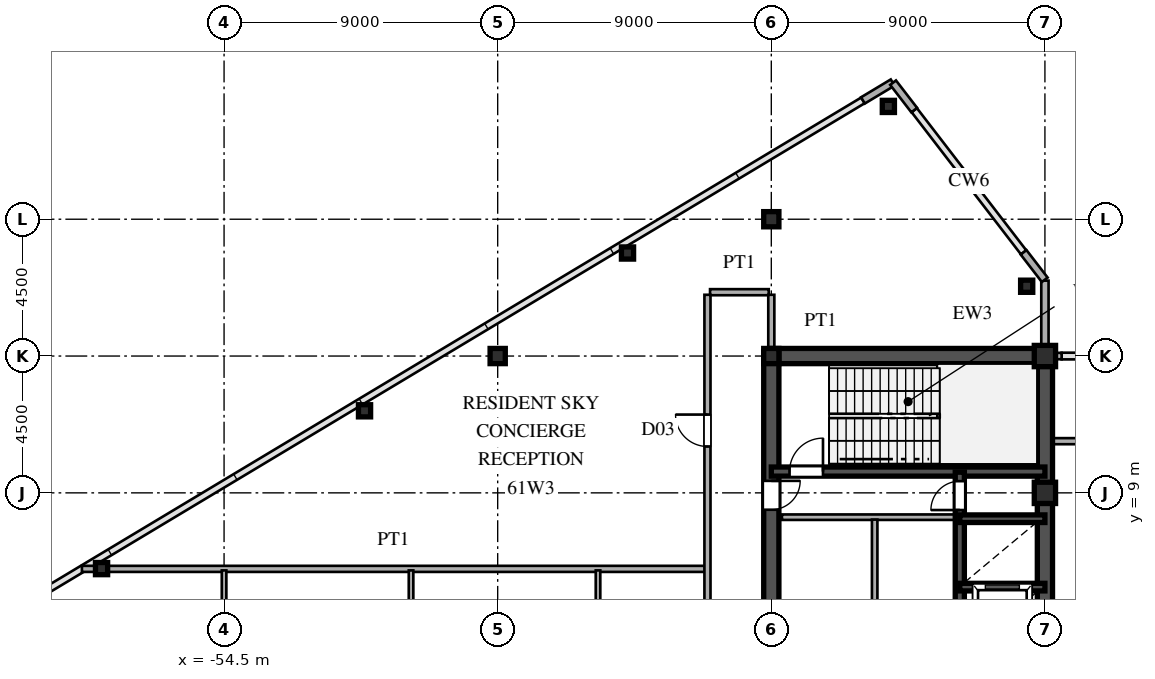
"""IFC4 building model, lengths in metres.
Left out: names, types, materials, properties, quantities, classifications, styles, units other than length and angle.
Written with IfcOpenShell. Run it as: python <this file> out.ifc"""

import sys

from ifc_helpers import new_model, si_unit, direction, frame, frame_2d, origin, origin_2d, place, context, subcontext, project, spatial, rectangle, hollow_rectangle, i_section, extrude, source, transform, mapped, element, fill, save


model = new_model("IFC4")
c1 = context("Model", 3, precision=1e-05, world=origin(), true_north=direction((0.0, 1.0)))
c2 = subcontext(c1, "Body", "Model", "MODEL_VIEW")
j1 = project(units=[si_unit("LENGTHUNIT", "METRE"), si_unit("PLANEANGLEUNIT", "RADIAN")], contexts=[c1])
p1 = place(None, origin())
s1 = spatial("IfcSite", under=j1, at=p1, CompositionType="ELEMENT")
p2 = place(p1, origin())
s2 = spatial("IfcBuilding", under=s1, at=p2, CompositionType="ELEMENT")
p3 = place(p2, frame((0.0, 0.0, 229.8)))
s3 = spatial("IfcBuildingStorey", under=s2, at=p3, CompositionType="ELEMENT", Elevation=229.8)
m1 = source(origin(), c2, "Body", "SweptSolid", [
    extrude(hollow_rectangle(XDim=0.7, YDim=0.7, WallThickness=0.03, at=origin_2d()), origin(), (0.0, 0.0, 1.0), 4.8),
])
for number, where, z_axis, x_axis in (
    (1, (-27.5, 9.0, 0.0), (0.0, 0.0, 1.0), (1.0, 0.0, 0.0)),
    (2, (-27.5, 13.5, 0.0), (0.0, 0.0, 1.0), (1.0, 0.0, 0.0)),
):
    element("IfcColumn", number, at=place(p3, frame(where, z_axis=z_axis, x_axis=x_axis)), inside=s3, PredefinedType="COLUMN", context=c2, shape_type="MappedRepresentation", body=[
        mapped(m1, transform((0.0, 0.0, 0.0), scale=1.0)),
    ])
m2 = source(origin(), c2, "Body", "SweptSolid", [
    extrude(i_section(OverallWidth=0.5, OverallDepth=0.5, WebThickness=0.02, FlangeThickness=0.032, at=origin_2d()), origin(), (0.0, 0.0, 1.0), 4.8),
])
for number, where, z_axis, x_axis in (
    (3, (-36.5, 13.5, 0.0), (0.0, 0.0, 1.0), (1.0, 0.0, 0.0)),
    (4, (-36.5, 18.0, 0.0), (0.0, 0.0, 1.0), (1.0, 0.0, 0.0)),
    (5, (-45.5, 13.5, 0.0), (0.0, 0.0, 1.0), (1.0, 0.0, 0.0)),
):
    element("IfcColumn", number, at=place(p3, frame(where, z_axis=z_axis, x_axis=x_axis)), inside=s3, PredefinedType="COLUMN", context=c2, shape_type="MappedRepresentation", body=[
        mapped(m2, transform((0.0, 0.0, 0.0), scale=1.0)),
    ])
m3 = source(origin(), c2, "Body", "SweptSolid", [
    extrude(hollow_rectangle(XDim=0.4, YDim=0.4, WallThickness=0.016, at=origin_2d()), origin(), (0.0, 0.0, 1.0), 4.8),
])
for number, where, z_axis, x_axis in (
    (6, (-28.1, 15.796, 0.0), (0.0, 0.0, 1.0), (1.0, 0.0, 0.0)),
    (7, (-32.65, 21.71, 0.0), (0.0, 0.0, 1.0), (1.0, 0.0, 0.0)),
    (8, (-41.23, 16.889, 0.0), (0.0, 0.0, 1.0), (1.0, 0.0, 0.0)),
    (9, (-49.88, 11.699, 0.0), (0.0, 0.0, 1.0), (1.0, 0.0, 0.0)),
    (10, (-58.53, 6.509, 0.0), (0.0, 0.0, 1.0), (1.0, 0.0, 0.0)),
):
    element("IfcColumn", number, at=place(p3, frame(where, z_axis=z_axis, x_axis=x_axis)), inside=s3, PredefinedType="COLUMN", context=c2, shape_type="MappedRepresentation", body=[
        mapped(m3, transform((0.0, 0.0, 0.0), scale=1.0)),
    ])
p4 = place(p3, frame((-27.5, 13.755, 0.0), z_axis=(0.0, 0.0, 1.0), x_axis=(0.0, 1.0, 0.0)))
e11 = element("IfcWall", 11, at=p4, inside=s3, PredefinedType="SOLIDWALL", context=c2, shape_type="SweptSolid", body=[
    extrude(rectangle(XDim=0.62, YDim=0.24, at=frame_2d((0.31, 0.0))), origin(), (0.0, 0.0, 1.0), 4.04),
])
p5 = place(p3, frame((-27.5, 14.375, 0.0), z_axis=(0.0, 0.0, 1.0), x_axis=(0.0, 1.0, 0.0)))
e12 = element("IfcWall", 12, at=p5, inside=s3, PredefinedType="SOLIDWALL", context=c2, shape_type="SweptSolid", body=[
    extrude(rectangle(XDim=1.605, YDim=0.24, at=frame_2d((0.803, 0.0))), origin(), (0.0, 0.0, 1.0), 4.54),
])
for number, where, z_axis, x_axis in (
    (13, (-27.506, 16.008, 0.0), (0.0, 0.0, 1.0), (-0.61, 0.793, 0.0)),
    (14, (-31.799, 21.588, 0.0), (0.0, 0.0, 1.0), (-0.61, 0.793, 0.0)),
    (15, (-32.509, 22.495, 0.0), (0.0, 0.0, 1.0), (-0.857, -0.515, 0.0)),
):
    element("IfcWall", number, at=place(p3, frame(where, z_axis=z_axis, x_axis=x_axis)), inside=s3, PredefinedType="SOLIDWALL", context=c2, shape_type="SweptSolid", body=[
        extrude(rectangle(XDim=1.14, YDim=0.24, at=frame_2d((0.57, 0.0))), origin(), (0.0, 0.0, 1.0), 4.54),
    ])
p6 = place(p3, frame((-27.49, 13.5, 0.0), z_axis=(0.0, 0.0, 1.0), x_axis=(1.0, 0.0, 0.0)))
e16 = element("IfcWall", 16, at=p6, inside=s3, PredefinedType="SOLIDWALL", context=c2, shape_type="SweptSolid", body=[
    extrude(rectangle(XDim=0.54, YDim=0.21, at=frame_2d((0.27, 0.0))), origin(), (0.0, 0.0, 1.0), 2.54),
])
p7 = place(p3, frame((-27.5, 1.3, 0.0), z_axis=(0.0, 0.0, 1.0), x_axis=(0.0, 1.0, 0.0)))
e17 = element("IfcWall", 17, at=p7, inside=s3, PredefinedType="SHEAR", context=c2, shape_type="SweptSolid", body=[
    extrude(rectangle(XDim=12.2, YDim=0.5, at=frame_2d((6.1, 0.0))), origin(), (0.0, 0.0, 1.0), 4.54),
])
p8 = place(p3, frame((-36.5, 13.5, 0.0), z_axis=(0.0, 0.0, 1.0), x_axis=(1.0, 0.0, 0.0)))
e18 = element("IfcWall", 18, at=p8, inside=s3, PredefinedType="SHEAR", context=c2, shape_type="SweptSolid", body=[
    extrude(rectangle(XDim=9.0, YDim=0.5, at=frame_2d((4.5, 0.0))), origin(), (0.0, 0.0, 1.0), 4.54),
])
p9 = place(p3, frame((-36.5, 8.2, 0.0), z_axis=(0.0, 0.0, 1.0), x_axis=(0.0, 1.0, 0.0)))
e19 = element("IfcWall", 19, at=p9, inside=s3, PredefinedType="SHEAR", context=c2, shape_type="SweptSolid", body=[
    extrude(rectangle(XDim=5.45, YDim=0.5, at=frame_2d((2.725, 0.0))), origin(), (0.0, 0.0, 1.0), 4.54),
])
p10 = place(p9, frame((0.245, 0.0, 0.0)))
e20 = element("IfcOpeningElement", 20, at=p10, cuts=e19, PredefinedType="OPENING", context=c2, shape_type="SweptSolid", body=[
    extrude(rectangle(XDim=0.95, YDim=2.15, at=frame_2d((0.475, 1.075))), frame((0.0, 0.26, 0.0), z_axis=(0.0, -1.0, 0.0), x_axis=(1.0, 0.0, 0.0)), (0.0, 0.0, 1.0), 0.52),
])
p11 = place(p3, frame((-36.5, 1.3, 0.0), z_axis=(0.0, 0.0, 1.0), x_axis=(0.0, 1.0, 0.0)))
e21 = element("IfcWall", 21, at=p11, inside=s3, PredefinedType="SHEAR", context=c2, shape_type="SweptSolid", body=[
    extrude(rectangle(XDim=6.9, YDim=0.5, at=frame_2d((3.45, 0.0))), origin(), (0.0, 0.0, 1.0), 4.54),
])
p12 = place(p11, frame((2.975, 0.0, 0.0)))
e22 = element("IfcOpeningElement", 22, at=p12, cuts=e21, PredefinedType="OPENING", context=c2, shape_type="SweptSolid", body=[
    extrude(rectangle(XDim=0.95, YDim=2.15, at=frame_2d((0.475, 1.075))), frame((0.0, 0.26, 0.0), z_axis=(0.0, -1.0, 0.0), x_axis=(1.0, 0.0, 0.0)), (0.0, 0.0, 1.0), 0.52),
])
p13 = place(p3, frame((-36.5, 9.7, 0.0), z_axis=(0.0, 0.0, 1.0), x_axis=(1.0, 0.0, 0.0)))
e23 = element("IfcWall", 23, at=p13, inside=s3, PredefinedType="SHEAR", context=c2, shape_type="SweptSolid", body=[
    extrude(rectangle(XDim=9.0, YDim=0.3, at=frame_2d((4.5, 0.0))), origin(), (0.0, 0.0, 1.0), 4.54),
])
p14 = place(p13, frame((0.6, 0.0, 0.0)))
e24 = element("IfcOpeningElement", 24, at=p14, cuts=e23, PredefinedType="OPENING", context=c2, shape_type="SweptSolid", body=[
    extrude(rectangle(XDim=1.1, YDim=2.2, at=frame_2d((0.55, 1.1))), frame((0.0, 0.16, 0.0), z_axis=(0.0, -1.0, 0.0), x_axis=(1.0, 0.0, 0.0)), (0.0, 0.0, 1.0), 0.32),
])
for number, where, z_axis, x_axis in (
    (25, (-30.3, 5.9, 0.0), (0.0, 0.0, 1.0), (1.0, 0.0, 0.0)),
    (26, (-30.3, 8.15, 0.0), (0.0, 0.0, 1.0), (1.0, 0.0, 0.0)),
):
    element("IfcWall", number, at=place(p3, frame(where, z_axis=z_axis, x_axis=x_axis)), inside=s3, PredefinedType="SHEAR", context=c2, shape_type="SweptSolid", body=[
        extrude(rectangle(XDim=2.8, YDim=0.25, at=frame_2d((1.4, 0.0))), origin(), (0.0, 0.0, 1.0), 4.54),
    ])
p15 = place(p3, frame((-30.3, 3.6, 0.0), z_axis=(0.0, 0.0, 1.0), x_axis=(0.0, 1.0, 0.0)))
e27 = element("IfcWall", 27, at=p15, inside=s3, PredefinedType="SHEAR", context=c2, shape_type="SweptSolid", body=[
    extrude(rectangle(XDim=2.3, YDim=0.3, at=frame_2d((1.15, 0.0))), origin(), (0.0, 0.0, 1.0), 4.54),
])
p16 = place(p15, frame((0.6, 0.0, 0.0)))
e28 = element("IfcOpeningElement", 28, at=p16, cuts=e27, PredefinedType="OPENING", context=c2, shape_type="SweptSolid", body=[
    extrude(rectangle(XDim=1.1, YDim=2.2, at=frame_2d((0.55, 1.1))), frame((0.0, 0.16, 0.0), z_axis=(0.0, -1.0, 0.0), x_axis=(1.0, 0.0, 0.0)), (0.0, 0.0, 1.0), 0.32),
])
p17 = place(p3, frame((-30.3, 5.9, 0.0), z_axis=(0.0, 0.0, 1.0), x_axis=(0.0, 1.0, 0.0)))
e29 = element("IfcWall", 29, at=p17, inside=s3, PredefinedType="SHEAR", context=c2, shape_type="SweptSolid", body=[
    extrude(rectangle(XDim=2.25, YDim=0.3, at=frame_2d((1.125, 0.0))), origin(), (0.0, 0.0, 1.0), 4.54),
])
p18 = place(p3, frame((-30.3, 8.15, 0.0), z_axis=(0.0, 0.0, 1.0), x_axis=(0.0, 1.0, 0.0)))
e30 = element("IfcWall", 30, at=p18, inside=s3, PredefinedType="SHEAR", context=c2, shape_type="SweptSolid", body=[
    extrude(rectangle(XDim=1.53, YDim=0.3, at=frame_2d((0.765, 0.0))), origin(), (0.0, 0.0, 1.0), 4.54),
])
p19 = place(p18, frame((0.285, 0.0, 0.0)))
e31 = element("IfcOpeningElement", 31, at=p19, cuts=e30, PredefinedType="OPENING", context=c2, shape_type="SweptSolid", body=[
    extrude(rectangle(XDim=0.95, YDim=2.15, at=frame_2d((0.475, 1.075))), frame((0.0, 0.16, 0.0), z_axis=(0.0, -1.0, 0.0), x_axis=(1.0, 0.0, 0.0)), (0.0, 0.0, 1.0), 0.32),
])
p20 = place(p3, frame((-36.15, 8.2, 0.0), z_axis=(0.0, 0.0, 1.0), x_axis=(1.0, 0.0, 0.0)))
e32 = element("IfcWall", 32, at=p20, inside=s3, PredefinedType="PARTITIONING", context=c2, shape_type="SweptSolid", body=[
    extrude(rectangle(XDim=5.7, YDim=0.18, at=frame_2d((2.85, 0.0))), origin(), (0.0, 0.0, 1.0), 4.54),
])
p21 = place(p3, frame((-33.1, 1.38, 0.0), z_axis=(0.0, 0.0, 1.0), x_axis=(0.0, 1.0, 0.0)))
e33 = element("IfcWall", 33, at=p21, inside=s3, PredefinedType="PARTITIONING", context=c2, shape_type="SweptSolid", body=[
    extrude(rectangle(XDim=6.74, YDim=0.18, at=frame_2d((3.37, 0.0))), origin(), (0.0, 0.0, 1.0), 4.54),
])
p22 = place(p3, frame((-59.176, 6.5, 0.0), z_axis=(0.0, 0.0, 1.0), x_axis=(1.0, 0.0, 0.0)))
e34 = element("IfcWall", 34, at=p22, inside=s3, PredefinedType="PARTITIONING", context=c2, shape_type="SweptSolid", body=[
    extrude(rectangle(XDim=20.496, YDim=0.2, at=frame_2d((10.248, 0.0))), origin(), (0.0, 0.0, 1.0), 4.54),
])
p23 = place(p3, frame((-27.245, 10.7, 0.0), z_axis=(0.0, 0.0, 1.0), x_axis=(1.0, 0.0, 0.0)))
e35 = element("IfcWall", 35, at=p23, inside=s3, PredefinedType="PARTITIONING", context=c2, shape_type="SweptSolid", body=[
    extrude(rectangle(XDim=54.49, YDim=0.2, at=frame_2d((27.245, 0.0))), origin(), (0.0, 0.0, 1.0), 4.54),
])
p24 = place(p23, frame((25.77, 0.0, 0.0)))
e36 = element("IfcOpeningElement", 36, at=p24, cuts=e35, PredefinedType="OPENING", context=c2, shape_type="SweptSolid", body=[
    extrude(rectangle(XDim=1.15, YDim=2.2, at=frame_2d((0.575, 1.1))), frame((0.0, 0.11, 0.0), z_axis=(0.0, -1.0, 0.0), x_axis=(1.0, 0.0, 0.0)), (0.0, 0.0, 1.0), 0.22),
])
p25 = place(p3, frame((-38.515, 15.6, 0.0), z_axis=(0.0, 0.0, 1.0), x_axis=(1.0, 0.0, 0.0)))
e37 = element("IfcWall", 37, at=p25, inside=s3, PredefinedType="PARTITIONING", context=c2, shape_type="SweptSolid", body=[
    extrude(rectangle(XDim=1.93, YDim=0.2, at=frame_2d((0.965, 0.0))), origin(), (0.0, 0.0, 1.0), 4.54),
])
p26 = place(p3, frame((-54.5, -7.45, 0.0), z_axis=(0.0, 0.0, 1.0), x_axis=(0.0, 1.0, 0.0)))
e38 = element("IfcWall", 38, at=p26, inside=s3, PredefinedType="PARTITIONING", context=c2, shape_type="SweptSolid", body=[
    extrude(rectangle(XDim=13.9, YDim=0.15, at=frame_2d((6.95, 0.0))), origin(), (0.0, 0.0, 1.0), 3.94),
])
p27 = place(p26, frame((6.475, 0.0, 0.0)))
e39 = element("IfcOpeningElement", 39, at=p27, cuts=e38, PredefinedType="OPENING", context=c2, shape_type="SweptSolid", body=[
    extrude(rectangle(XDim=0.95, YDim=2.15, at=frame_2d((0.475, 1.075))), frame((0.0, 0.085, 0.0), z_axis=(0.0, -1.0, 0.0), x_axis=(1.0, 0.0, 0.0)), (0.0, 0.0, 1.0), 0.17),
])
p28 = place(p3, frame((-48.35, -7.45, 0.0), z_axis=(0.0, 0.0, 1.0), x_axis=(0.0, 1.0, 0.0)))
e40 = element("IfcWall", 40, at=p28, inside=s3, PredefinedType="PARTITIONING", context=c2, shape_type="SweptSolid", body=[
    extrude(rectangle(XDim=13.9, YDim=0.15, at=frame_2d((6.95, 0.0))), origin(), (0.0, 0.0, 1.0), 4.54),
])
p29 = place(p28, frame((6.475, 0.0, 0.0)))
e41 = element("IfcOpeningElement", 41, at=p29, cuts=e40, PredefinedType="OPENING", context=c2, shape_type="SweptSolid", body=[
    extrude(rectangle(XDim=0.95, YDim=2.15, at=frame_2d((0.475, 1.075))), frame((0.0, 0.085, 0.0), z_axis=(0.0, -1.0, 0.0), x_axis=(1.0, 0.0, 0.0)), (0.0, 0.0, 1.0), 0.17),
])
p30 = place(p28, frame((1.808, 0.0, 0.0)))
e42 = element("IfcOpeningElement", 42, at=p30, cuts=e40, PredefinedType="OPENING", context=c2, shape_type="SweptSolid", body=[
    extrude(rectangle(XDim=0.95, YDim=2.15, at=frame_2d((0.475, 1.075))), frame((0.0, 0.085, 0.0), z_axis=(0.0, -1.0, 0.0), x_axis=(1.0, 0.0, 0.0)), (0.0, 0.0, 1.0), 0.17),
])
p31 = place(p3, frame((-42.2, 2.352, 0.0), z_axis=(0.0, 0.0, 1.0), x_axis=(0.0, 1.0, 0.0)))
e43 = element("IfcWall", 43, at=p31, inside=s3, PredefinedType="PARTITIONING", context=c2, shape_type="SweptSolid", body=[
    extrude(rectangle(XDim=4.098, YDim=0.15, at=frame_2d((2.049, 0.0))), origin(), (0.0, 0.0, 1.0), 4.54),
])
p32 = place(p3, frame((-38.6, -15.515, 0.0), z_axis=(0.0, 0.0, 1.0), x_axis=(0.0, 1.0, 0.0)))
e44 = element("IfcWall", 44, at=p32, inside=s3, PredefinedType="PARTITIONING", context=c2, shape_type="SweptSolid", body=[
    extrude(rectangle(XDim=31.03, YDim=0.2, at=frame_2d((15.515, 0.0))), origin(), (0.0, 0.0, 1.0), 4.54),
])
p33 = place(p32, frame((3.44, 0.0, 0.0)))
e45 = element("IfcOpeningElement", 45, at=p33, cuts=e44, PredefinedType="OPENING", context=c2, shape_type="SweptSolid", body=[
    extrude(rectangle(XDim=1.05, YDim=2.25, at=frame_2d((0.525, 1.125))), frame((0.0, 0.11, 0.0), z_axis=(0.0, -1.0, 0.0), x_axis=(1.0, 0.0, 0.0)), (0.0, 0.0, 1.0), 0.22),
])
p34 = place(p32, frame((14.28, 0.0, 0.0)))
e46 = element("IfcOpeningElement", 46, at=p34, cuts=e44, PredefinedType="OPENING", context=c2, shape_type="SweptSolid", body=[
    extrude(rectangle(XDim=1.05, YDim=2.25, at=frame_2d((0.525, 1.125))), frame((0.0, 0.11, 0.0), z_axis=(0.0, -1.0, 0.0), x_axis=(1.0, 0.0, 0.0)), (0.0, 0.0, 1.0), 0.22),
])
p35 = place(p32, frame((26.04, 0.0, 0.0)))
e47 = element("IfcOpeningElement", 47, at=p35, cuts=e44, PredefinedType="OPENING", context=c2, shape_type="SweptSolid", body=[
    extrude(rectangle(XDim=1.05, YDim=2.25, at=frame_2d((0.525, 1.125))), frame((0.0, 0.11, 0.0), z_axis=(0.0, -1.0, 0.0), x_axis=(1.0, 0.0, 0.0)), (0.0, 0.0, 1.0), 0.22),
])
p36 = place(p3, frame((-36.5, 13.755, 0.0), z_axis=(0.0, 0.0, 1.0), x_axis=(0.0, 1.0, 0.0)))
e48 = element("IfcWall", 48, at=p36, inside=s3, PredefinedType="PARTITIONING", context=c2, shape_type="SweptSolid", body=[
    extrude(rectangle(XDim=1.76, YDim=0.2, at=frame_2d((0.88, 0.0))), origin(), (0.0, 0.0, 1.0), 3.94),
])
m4 = source(origin(), c2, "Body", "SweptSolid", [
    extrude(rectangle(XDim=0.95, YDim=2.15, at=frame_2d((0.475, 1.075))), frame((0.0, 0.025, 0.0), z_axis=(0.0, -1.0, 0.0), x_axis=(1.0, 0.0, 0.0)), (0.0, 0.0, 1.0), 0.05),
])
p37 = place(p10, frame((0.95, 0.0, 0.0), z_axis=(0.0, 0.0, 1.0), x_axis=(-1.0, 0.0, 0.0)))
e49 = element("IfcDoor", 49, at=p37, inside=s3, OperationType="SINGLE_SWING_RIGHT", PredefinedType="DOOR", context=c2, shape_type="MappedRepresentation", body=[
    mapped(m4, transform((0.0, 0.0, 0.0), scale=1.0)),
])
fill(e20, e49)
m5 = source(origin(), c2, "Body", "SweptSolid", [
    extrude(rectangle(XDim=1.1, YDim=2.2, at=frame_2d((0.55, 1.1))), frame((0.0, 0.025, 0.0), z_axis=(0.0, -1.0, 0.0), x_axis=(1.0, 0.0, 0.0)), (0.0, 0.0, 1.0), 0.05),
])
p38 = place(p14, origin())
e50 = element("IfcDoor", 50, at=p38, inside=s3, OperationType="SINGLE_SWING_RIGHT", PredefinedType="DOOR", context=c2, shape_type="MappedRepresentation", body=[
    mapped(m5, transform((0.0, 0.0, 0.0), scale=1.0)),
])
fill(e24, e50)
p39 = place(p19, origin())
e51 = element("IfcDoor", 51, at=p39, inside=s3, OperationType="SINGLE_SWING_LEFT", PredefinedType="DOOR", context=c2, shape_type="MappedRepresentation", body=[
    mapped(m4, transform((0.0, 0.0, 0.0), scale=1.0)),
])
fill(e31, e51)
m6 = source(origin(), c2, "Body", "SweptSolid", [
    extrude(rectangle(XDim=1.05, YDim=2.25, at=frame_2d((0.525, 1.125))), frame((0.0, 0.025, 0.0), z_axis=(0.0, -1.0, 0.0), x_axis=(1.0, 0.0, 0.0)), (0.0, 0.0, 1.0), 0.05),
])
p40 = place(p35, origin())
e52 = element("IfcDoor", 52, at=p40, inside=s3, OperationType="SINGLE_SWING_RIGHT", PredefinedType="DOOR", context=c2, shape_type="MappedRepresentation", body=[
    mapped(m6, transform((0.0, 0.0, 0.0), scale=1.0)),
])
fill(e47, e52)
save(model, sys.argv[1])
